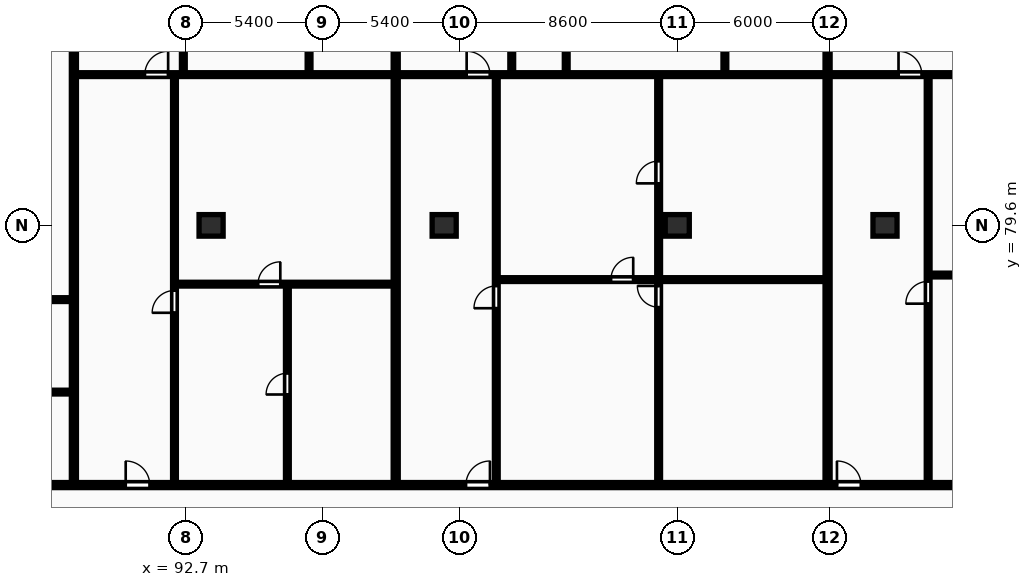
"""IFC4 building model, lengths in metres.
Left out: names, types, materials, properties, quantities, classifications, styles, units other than length and angle.
Written with IfcOpenShell. Run it as: python <this file> out.ifc"""

import sys

from ifc_helpers import new_model, si_unit, direction, frame, frame_2d, origin, origin_2d, place, context, subcontext, project, spatial, rectangle, extrude, element, fill, save


model = new_model("IFC4")
c1 = context("Model", 3, precision=1e-05, world=origin(), true_north=direction((0.0, 1.0)))
c2 = subcontext(c1, "Body", "Model", "MODEL_VIEW")
j1 = project(units=[si_unit("LENGTHUNIT", "METRE"), si_unit("PLANEANGLEUNIT", "RADIAN")], contexts=[c1])
p1 = place(None, origin())
s1 = spatial("IfcSite", under=j1, at=p1, CompositionType="ELEMENT")
p2 = place(p1, origin())
s2 = spatial("IfcBuilding", under=s1, at=p2, CompositionType="ELEMENT")
p3 = place(p2, frame((0.0, 0.0, 80.8)))
s3 = spatial("IfcBuildingStorey", under=s2, at=p3, CompositionType="ELEMENT", Elevation=80.8)
for number, where, z_axis, x_axis in (
    (1, (93.7, 79.6, 0.0), (0.0, 0.0, 1.0), (1.0, 0.0, 0.0)),
    (2, (102.9, 79.6, 0.0), (0.0, 0.0, 1.0), (1.0, 0.0, 0.0)),
    (3, (112.1, 79.6, 0.0), (0.0, 0.0, 1.0), (1.0, 0.0, 0.0)),
    (4, (120.3, 79.6, 0.0), (0.0, 0.0, 1.0), (1.0, 0.0, 0.0)),
):
    element("IfcColumn", number, at=place(p3, frame(where, z_axis=z_axis, x_axis=x_axis)), inside=s3, PredefinedType="COLUMN", context=c2, shape_type="SweptSolid", body=[
        extrude(rectangle(XDim=0.95, YDim=0.85, at=origin_2d()), origin(), (0.0, 0.0, 1.0), 3.25),
    ])
p4 = place(p3, frame((88.285, 69.43, 0.0), z_axis=(0.0, 0.0, 1.0), x_axis=(0.0, 1.0, 0.0)))
e5 = element("IfcWall", 5, at=p4, inside=s3, PredefinedType="PARTITIONING", context=c2, shape_type="SweptSolid", body=[
    extrude(rectangle(XDim=26.47, YDim=0.2, at=frame_2d((13.235, 0.0))), origin(), (0.0, 0.0, 1.0), 2.97),
])
for number, where, z_axis, x_axis in (
    (6, (85.075, 73.02, 0.0), (0.0, 0.0, 1.0), (1.0, 0.0, 0.0)),
    (7, (85.075, 76.67, 0.0), (0.0, 0.0, 1.0), (1.0, 0.0, 0.0)),
):
    element("IfcWall", number, at=place(p3, frame(where, z_axis=z_axis, x_axis=x_axis)), inside=s3, PredefinedType="PARTITIONING", context=c2, shape_type="SweptSolid", body=[
        extrude(rectangle(XDim=3.13, YDim=0.15, at=frame_2d((1.565, 0.0))), origin(), (0.0, 0.0, 1.0), 2.97),
    ])
p5 = place(p3, frame((100.987, 69.43, 0.0), z_axis=(0.0, 0.0, 1.0), x_axis=(0.0, 1.0, 0.0)))
e8 = element("IfcWall", 8, at=p5, inside=s3, PredefinedType="PARTITIONING", context=c2, shape_type="SweptSolid", body=[
    extrude(rectangle(XDim=26.47, YDim=0.2, at=frame_2d((13.235, 0.0))), origin(), (0.0, 0.0, 1.0), 2.97),
])
p6 = place(p3, frame((96.711, 69.41, 0.0), z_axis=(0.0, 0.0, 1.0), x_axis=(0.0, 1.0, 0.0)))
e9 = element("IfcWall", 9, at=p6, inside=s3, PredefinedType="PARTITIONING", context=c2, shape_type="SweptSolid", body=[
    extrude(rectangle(XDim=7.87, YDim=0.15, at=frame_2d((3.935, 0.0))), origin(), (0.0, 0.0, 1.0), 2.97),
])
p7 = place(p6, frame((3.515, 0.0, 0.0)))
e10 = element("IfcOpeningElement", 10, at=p7, cuts=e9, PredefinedType="OPENING", context=c2, shape_type="SweptSolid", body=[
    extrude(rectangle(XDim=0.84, YDim=2.04, at=frame_2d((0.42, 1.02))), frame((0.0, 0.085, 0.0), z_axis=(0.0, -1.0, 0.0), x_axis=(1.0, 0.0, 0.0)), (0.0, 0.0, 1.0), 0.17),
])
p8 = place(p3, frame((92.315, 77.28, 0.0), z_axis=(0.0, 0.0, 1.0), x_axis=(1.0, 0.0, 0.0)))
e11 = element("IfcWall", 11, at=p8, inside=s3, PredefinedType="PARTITIONING", context=c2, shape_type="SweptSolid", body=[
    extrude(rectangle(XDim=8.593, YDim=0.15, at=frame_2d((4.296, 0.0))), origin(), (0.0, 0.0, 1.0), 2.97),
])
p9 = place(p8, frame((3.237, 0.0, 0.0)))
e12 = element("IfcOpeningElement", 12, at=p9, cuts=e11, PredefinedType="OPENING", context=c2, shape_type="SweptSolid", body=[
    extrude(rectangle(XDim=0.88, YDim=2.06, at=frame_2d((0.44, 1.03))), frame((0.0, 0.085, 0.0), z_axis=(0.0, -1.0, 0.0), x_axis=(1.0, 0.0, 0.0)), (0.0, 0.0, 1.0), 0.17),
])
p10 = place(p3, frame((92.255, 69.41, 0.0), z_axis=(0.0, 0.0, 1.0), x_axis=(0.0, 1.0, 0.0)))
e13 = element("IfcWall", 13, at=p10, inside=s3, PredefinedType="PARTITIONING", context=c2, shape_type="SweptSolid", body=[
    extrude(rectangle(XDim=16.1, YDim=0.15, at=frame_2d((8.05, 0.0))), origin(), (0.0, 0.0, 1.0), 2.97),
])
p11 = place(p10, frame((6.74, 0.0, 0.0)))
e14 = element("IfcOpeningElement", 14, at=p11, cuts=e13, PredefinedType="OPENING", context=c2, shape_type="SweptSolid", body=[
    extrude(rectangle(XDim=0.88, YDim=2.06, at=frame_2d((0.44, 1.03))), frame((0.0, 0.085, 0.0), z_axis=(0.0, -1.0, 0.0), x_axis=(1.0, 0.0, 0.0)), (0.0, 0.0, 1.0), 0.17),
])
p12 = place(p3, frame((92.604, 85.59, 0.0), z_axis=(0.0, 0.0, 1.0), x_axis=(0.0, 1.0, 0.0)))
e15 = element("IfcWall", 15, at=p12, inside=s3, PredefinedType="PARTITIONING", context=c2, shape_type="SweptSolid", body=[
    extrude(rectangle(XDim=5.0, YDim=0.15, at=frame_2d((2.5, 0.0))), origin(), (0.0, 0.0, 1.0), 2.97),
])
p13 = place(p12, frame((2.06, 0.0, 0.0)))
e16 = element("IfcOpeningElement", 16, at=p13, cuts=e15, PredefinedType="OPENING", context=c2, shape_type="SweptSolid", body=[
    extrude(rectangle(XDim=0.88, YDim=2.06, at=frame_2d((0.44, 1.03))), frame((0.0, 0.085, 0.0), z_axis=(0.0, -1.0, 0.0), x_axis=(1.0, 0.0, 0.0)), (0.0, 0.0, 1.0), 0.17),
])
p14 = place(p3, frame((97.567, 85.59, 0.0), z_axis=(0.0, 0.0, 1.0), x_axis=(0.0, 1.0, 0.0)))
e17 = element("IfcWall", 17, at=p14, inside=s3, PredefinedType="PARTITIONING", context=c2, shape_type="SweptSolid", body=[
    extrude(rectangle(XDim=10.31, YDim=0.15, at=frame_2d((5.155, 0.0))), origin(), (0.0, 0.0, 1.0), 2.97),
])
p15 = place(p14, frame((1.43, 0.0, 0.0)))
e18 = element("IfcOpeningElement", 18, at=p15, cuts=e17, PredefinedType="OPENING", context=c2, shape_type="SweptSolid", body=[
    extrude(rectangle(XDim=0.84, YDim=2.04, at=frame_2d((0.42, 1.02))), frame((0.0, 0.085, 0.0), z_axis=(0.0, -1.0, 0.0), x_axis=(1.0, 0.0, 0.0)), (0.0, 0.0, 1.0), 0.17),
])
p16 = place(p14, frame((3.92, 0.0, 0.0)))
e19 = element("IfcOpeningElement", 19, at=p16, cuts=e17, PredefinedType="OPENING", context=c2, shape_type="SweptSolid", body=[
    extrude(rectangle(XDim=0.84, YDim=2.04, at=frame_2d((0.42, 1.02))), frame((0.0, 0.085, 0.0), z_axis=(0.0, -1.0, 0.0), x_axis=(1.0, 0.0, 0.0)), (0.0, 0.0, 1.0), 0.17),
])
p17 = place(p14, frame((5.48, 0.0, 0.0)))
e20 = element("IfcOpeningElement", 20, at=p17, cuts=e17, PredefinedType="OPENING", context=c2, shape_type="SweptSolid", body=[
    extrude(rectangle(XDim=0.88, YDim=2.06, at=frame_2d((0.44, 1.03))), frame((0.0, 0.085, 0.0), z_axis=(0.0, -1.0, 0.0), x_axis=(1.0, 0.0, 0.0)), (0.0, 0.0, 1.0), 0.17),
])
p18 = place(p3, frame((88.365, 85.55, 0.0), z_axis=(0.0, 0.0, 1.0), x_axis=(1.0, 0.0, 0.0)))
e21 = element("IfcWall", 21, at=p18, inside=s3, PredefinedType="PARTITIONING", context=c2, shape_type="SweptSolid", body=[
    extrude(rectangle(XDim=12.543, YDim=0.15, at=frame_2d((6.271, 0.0))), origin(), (0.0, 0.0, 1.0), 2.97),
])
p19 = place(p18, frame((2.72, 0.0, 0.0)))
e22 = element("IfcOpeningElement", 22, at=p19, cuts=e21, PredefinedType="OPENING", context=c2, shape_type="SweptSolid", body=[
    extrude(rectangle(XDim=0.92, YDim=2.08, at=frame_2d((0.46, 1.04))), frame((0.0, 0.085, 0.0), z_axis=(0.0, -1.0, 0.0), x_axis=(1.0, 0.0, 0.0)), (0.0, 0.0, 1.0), 0.17),
])
p20 = place(p3, frame((118.033, 69.43, 0.0), z_axis=(0.0, 0.0, 1.0), x_axis=(0.0, 1.0, 0.0)))
e23 = element("IfcWall", 23, at=p20, inside=s3, PredefinedType="PARTITIONING", context=c2, shape_type="SweptSolid", body=[
    extrude(rectangle(XDim=26.47, YDim=0.2, at=frame_2d((13.235, 0.0))), origin(), (0.0, 0.0, 1.0), 2.97),
])
p21 = place(p3, frame((111.365, 69.41, 0.0), z_axis=(0.0, 0.0, 1.0), x_axis=(0.0, 1.0, 0.0)))
e24 = element("IfcWall", 24, at=p21, inside=s3, PredefinedType="PARTITIONING", context=c2, shape_type="SweptSolid", body=[
    extrude(rectangle(XDim=16.1, YDim=0.15, at=frame_2d((8.05, 0.0))), origin(), (0.0, 0.0, 1.0), 2.97),
])
p22 = place(p21, frame((6.96, 0.0, 0.0)))
e25 = element("IfcOpeningElement", 25, at=p22, cuts=e24, PredefinedType="OPENING", context=c2, shape_type="SweptSolid", body=[
    extrude(rectangle(XDim=0.84, YDim=2.04, at=frame_2d((0.42, 1.02))), frame((0.0, 0.085, 0.0), z_axis=(0.0, -1.0, 0.0), x_axis=(1.0, 0.0, 0.0)), (0.0, 0.0, 1.0), 0.17),
])
p23 = place(p21, frame((11.848, 0.0, 0.0)))
e26 = element("IfcOpeningElement", 26, at=p23, cuts=e24, PredefinedType="OPENING", context=c2, shape_type="SweptSolid", body=[
    extrude(rectangle(XDim=0.88, YDim=2.06, at=frame_2d((0.44, 1.03))), frame((0.0, 0.085, 0.0), z_axis=(0.0, -1.0, 0.0), x_axis=(1.0, 0.0, 0.0)), (0.0, 0.0, 1.0), 0.17),
])
p24 = place(p3, frame((105.017, 77.46, 0.0), z_axis=(0.0, 0.0, 1.0), x_axis=(1.0, 0.0, 0.0)))
e27 = element("IfcWall", 27, at=p24, inside=s3, PredefinedType="PARTITIONING", context=c2, shape_type="SweptSolid", body=[
    extrude(rectangle(XDim=12.936, YDim=0.15, at=frame_2d((6.468, 0.0))), origin(), (0.0, 0.0, 1.0), 2.97),
])
p25 = place(p24, frame((4.464, 0.0, 0.0)))
e28 = element("IfcOpeningElement", 28, at=p25, cuts=e27, PredefinedType="OPENING", context=c2, shape_type="SweptSolid", body=[
    extrude(rectangle(XDim=0.88, YDim=2.06, at=frame_2d((0.44, 1.03))), frame((0.0, 0.085, 0.0), z_axis=(0.0, -1.0, 0.0), x_axis=(1.0, 0.0, 0.0)), (0.0, 0.0, 1.0), 0.17),
])
p26 = place(p3, frame((104.957, 69.41, 0.0), z_axis=(0.0, 0.0, 1.0), x_axis=(0.0, 1.0, 0.0)))
e29 = element("IfcWall", 29, at=p26, inside=s3, PredefinedType="PARTITIONING", context=c2, shape_type="SweptSolid", body=[
    extrude(rectangle(XDim=16.1, YDim=0.15, at=frame_2d((8.05, 0.0))), origin(), (0.0, 0.0, 1.0), 2.97),
])
p27 = place(p26, frame((6.92, 0.0, 0.0)))
e30 = element("IfcOpeningElement", 30, at=p27, cuts=e29, PredefinedType="OPENING", context=c2, shape_type="SweptSolid", body=[
    extrude(rectangle(XDim=0.88, YDim=2.06, at=frame_2d((0.44, 1.03))), frame((0.0, 0.085, 0.0), z_axis=(0.0, -1.0, 0.0), x_axis=(1.0, 0.0, 0.0)), (0.0, 0.0, 1.0), 0.17),
])
p28 = place(p3, frame((107.717, 85.59, 0.0), z_axis=(0.0, 0.0, 1.0), x_axis=(0.0, 1.0, 0.0)))
e31 = element("IfcWall", 31, at=p28, inside=s3, PredefinedType="PARTITIONING", context=c2, shape_type="SweptSolid", body=[
    extrude(rectangle(XDim=2.58, YDim=0.15, at=frame_2d((1.29, 0.0))), origin(), (0.0, 0.0, 1.0), 2.97),
])
p29 = place(p3, frame((105.567, 85.59, 0.0), z_axis=(0.0, 0.0, 1.0), x_axis=(0.0, 1.0, 0.0)))
e32 = element("IfcWall", 32, at=p29, inside=s3, PredefinedType="PARTITIONING", context=c2, shape_type="SweptSolid", body=[
    extrude(rectangle(XDim=10.31, YDim=0.15, at=frame_2d((5.155, 0.0))), origin(), (0.0, 0.0, 1.0), 2.97),
])
p30 = place(p29, frame((3.82, 0.0, 0.0)))
e33 = element("IfcOpeningElement", 33, at=p30, cuts=e32, PredefinedType="OPENING", context=c2, shape_type="SweptSolid", body=[
    extrude(rectangle(XDim=0.92, YDim=2.08, at=frame_2d((0.46, 1.04))), frame((0.0, 0.085, 0.0), z_axis=(0.0, -1.0, 0.0), x_axis=(1.0, 0.0, 0.0)), (0.0, 0.0, 1.0), 0.17),
])
p31 = place(p3, frame((113.98, 85.59, 0.0), z_axis=(0.0, 0.0, 1.0), x_axis=(0.0, 1.0, 0.0)))
e34 = element("IfcWall", 34, at=p31, inside=s3, PredefinedType="PARTITIONING", context=c2, shape_type="SweptSolid", body=[
    extrude(rectangle(XDim=2.58, YDim=0.15, at=frame_2d((1.29, 0.0))), origin(), (0.0, 0.0, 1.0), 2.97),
])
p32 = place(p3, frame((101.067, 85.55, 0.0), z_axis=(0.0, 0.0, 1.0), x_axis=(1.0, 0.0, 0.0)))
e35 = element("IfcWall", 35, at=p32, inside=s3, PredefinedType="PARTITIONING", context=c2, shape_type="SweptSolid", body=[
    extrude(rectangle(XDim=16.886, YDim=0.15, at=frame_2d((8.443, 0.0))), origin(), (0.0, 0.0, 1.0), 2.97),
])
p33 = place(p32, frame((2.72, 0.0, 0.0)))
e36 = element("IfcOpeningElement", 36, at=p33, cuts=e35, PredefinedType="OPENING", context=c2, shape_type="SweptSolid", body=[
    extrude(rectangle(XDim=0.92, YDim=2.08, at=frame_2d((0.46, 1.04))), frame((0.0, 0.085, 0.0), z_axis=(0.0, -1.0, 0.0), x_axis=(1.0, 0.0, 0.0)), (0.0, 0.0, 1.0), 0.17),
])
p34 = place(p3, frame((122.063, 77.64, 0.0), z_axis=(0.0, 0.0, 1.0), x_axis=(1.0, 0.0, 0.0)))
e37 = element("IfcWall", 37, at=p34, inside=s3, PredefinedType="PARTITIONING", context=c2, shape_type="SweptSolid", body=[
    extrude(rectangle(XDim=8.457, YDim=0.15, at=frame_2d((4.228, 0.0))), origin(), (0.0, 0.0, 1.0), 2.97),
])
p35 = place(p34, frame((3.171, 0.0, 0.0)))
e38 = element("IfcOpeningElement", 38, at=p35, cuts=e37, PredefinedType="OPENING", context=c2, shape_type="SweptSolid", body=[
    extrude(rectangle(XDim=0.88, YDim=2.06, at=frame_2d((0.44, 1.03))), frame((0.0, 0.085, 0.0), z_axis=(0.0, -1.0, 0.0), x_axis=(1.0, 0.0, 0.0)), (0.0, 0.0, 1.0), 0.17),
])
p36 = place(p3, frame((122.003, 69.41, 0.0), z_axis=(0.0, 0.0, 1.0), x_axis=(0.0, 1.0, 0.0)))
e39 = element("IfcWall", 39, at=p36, inside=s3, PredefinedType="PARTITIONING", context=c2, shape_type="SweptSolid", body=[
    extrude(rectangle(XDim=16.1, YDim=0.15, at=frame_2d((8.05, 0.0))), origin(), (0.0, 0.0, 1.0), 2.97),
])
p37 = place(p36, frame((7.1, 0.0, 0.0)))
e40 = element("IfcOpeningElement", 40, at=p37, cuts=e39, PredefinedType="OPENING", context=c2, shape_type="SweptSolid", body=[
    extrude(rectangle(XDim=0.88, YDim=2.06, at=frame_2d((0.44, 1.03))), frame((0.0, 0.085, 0.0), z_axis=(0.0, -1.0, 0.0), x_axis=(1.0, 0.0, 0.0)), (0.0, 0.0, 1.0), 0.17),
])
p38 = place(p3, frame((118.113, 85.55, 0.0), z_axis=(0.0, 0.0, 1.0), x_axis=(1.0, 0.0, 0.0)))
e41 = element("IfcWall", 41, at=p38, inside=s3, PredefinedType="PARTITIONING", context=c2, shape_type="SweptSolid", body=[
    extrude(rectangle(XDim=12.407, YDim=0.15, at=frame_2d((6.203, 0.0))), origin(), (0.0, 0.0, 1.0), 2.97),
])
p39 = place(p38, frame((2.72, 0.0, 0.0)))
e42 = element("IfcOpeningElement", 42, at=p39, cuts=e41, PredefinedType="OPENING", context=c2, shape_type="SweptSolid", body=[
    extrude(rectangle(XDim=0.92, YDim=2.08, at=frame_2d((0.46, 1.04))), frame((0.0, 0.085, 0.0), z_axis=(0.0, -1.0, 0.0), x_axis=(1.0, 0.0, 0.0)), (0.0, 0.0, 1.0), 0.17),
])
p40 = place(p3, frame((57.6, 69.35, 0.0), z_axis=(0.0, 0.0, 1.0), x_axis=(1.0, 0.0, 0.0)))
e43 = element("IfcWall", 43, at=p40, inside=s3, PredefinedType="PARTITIONING", context=c2, shape_type="SweptSolid", body=[
    extrude(rectangle(XDim=73.0, YDim=0.2, at=frame_2d((36.5, 0.0))), origin(), (0.0, 0.0, 1.0), 2.97),
])
p41 = place(p40, frame((0.37, 0.0, 0.0)))
e44 = element("IfcOpeningElement", 44, at=p41, cuts=e43, PredefinedType="OPENING", context=c2, shape_type="SweptSolid", body=[
    extrude(rectangle(XDim=0.95, YDim=2.15, at=frame_2d((0.475, 1.075))), frame((0.0, 0.11, 0.0), z_axis=(0.0, -1.0, 0.0), x_axis=(1.0, 0.0, 0.0)), (0.0, 0.0, 1.0), 0.22),
])
p42 = place(p40, frame((20.421, 0.0, 0.0)))
e45 = element("IfcOpeningElement", 45, at=p42, cuts=e43, PredefinedType="OPENING", context=c2, shape_type="SweptSolid", body=[
    extrude(rectangle(XDim=1.22, YDim=2.18, at=frame_2d((0.61, 1.09))), frame((0.0, 0.11, 0.0), z_axis=(0.0, -1.0, 0.0), x_axis=(1.0, 0.0, 0.0)), (0.0, 0.0, 1.0), 0.22),
])
p43 = place(p40, frame((32.729, 0.0, 0.0)))
e46 = element("IfcOpeningElement", 46, at=p43, cuts=e43, PredefinedType="OPENING", context=c2, shape_type="SweptSolid", body=[
    extrude(rectangle(XDim=0.95, YDim=2.15, at=frame_2d((0.475, 1.075))), frame((0.0, 0.11, 0.0), z_axis=(0.0, -1.0, 0.0), x_axis=(1.0, 0.0, 0.0)), (0.0, 0.0, 1.0), 0.22),
])
p44 = place(p40, frame((46.157, 0.0, 0.0)))
e47 = element("IfcOpeningElement", 47, at=p44, cuts=e43, PredefinedType="OPENING", context=c2, shape_type="SweptSolid", body=[
    extrude(rectangle(XDim=0.95, YDim=2.15, at=frame_2d((0.475, 1.075))), frame((0.0, 0.11, 0.0), z_axis=(0.0, -1.0, 0.0), x_axis=(1.0, 0.0, 0.0)), (0.0, 0.0, 1.0), 0.22),
])
p45 = place(p40, frame((60.803, 0.0, 0.0)))
e48 = element("IfcOpeningElement", 48, at=p45, cuts=e43, PredefinedType="OPENING", context=c2, shape_type="SweptSolid", body=[
    extrude(rectangle(XDim=0.95, YDim=2.15, at=frame_2d((0.475, 1.075))), frame((0.0, 0.11, 0.0), z_axis=(0.0, -1.0, 0.0), x_axis=(1.0, 0.0, 0.0)), (0.0, 0.0, 1.0), 0.22),
])
p46 = place(p7, origin())
e49 = element("IfcDoor", 49, at=p46, inside=s3, OperationType="SINGLE_SWING_LEFT", PredefinedType="DOOR", context=c2, shape_type="SweptSolid", body=[
    extrude(rectangle(XDim=0.84, YDim=2.04, at=frame_2d((0.42, 1.02))), frame((0.0, 0.025, 0.0), z_axis=(0.0, -1.0, 0.0), x_axis=(1.0, 0.0, 0.0)), (0.0, 0.0, 1.0), 0.05),
])
fill(e10, e49)
p47 = place(p9, origin())
e50 = element("IfcDoor", 50, at=p47, inside=s3, OperationType="SINGLE_SWING_RIGHT", PredefinedType="DOOR", context=c2, shape_type="SweptSolid", body=[
    extrude(rectangle(XDim=0.88, YDim=2.06, at=frame_2d((0.44, 1.03))), frame((0.0, 0.025, 0.0), z_axis=(0.0, -1.0, 0.0), x_axis=(1.0, 0.0, 0.0)), (0.0, 0.0, 1.0), 0.05),
])
fill(e12, e50)
p48 = place(p11, origin())
e51 = element("IfcDoor", 51, at=p48, inside=s3, OperationType="SINGLE_SWING_LEFT", PredefinedType="DOOR", context=c2, shape_type="SweptSolid", body=[
    extrude(rectangle(XDim=0.88, YDim=2.06, at=frame_2d((0.44, 1.03))), frame((0.0, 0.025, 0.0), z_axis=(0.0, -1.0, 0.0), x_axis=(1.0, 0.0, 0.0)), (0.0, 0.0, 1.0), 0.05),
])
fill(e14, e51)
p49 = place(p19, origin())
e52 = element("IfcDoor", 52, at=p49, inside=s3, OperationType="SINGLE_SWING_RIGHT", PredefinedType="DOOR", context=c2, shape_type="SweptSolid", body=[
    extrude(rectangle(XDim=0.92, YDim=2.08, at=frame_2d((0.46, 1.04))), frame((0.0, 0.025, 0.0), z_axis=(0.0, -1.0, 0.0), x_axis=(1.0, 0.0, 0.0)), (0.0, 0.0, 1.0), 0.05),
])
fill(e22, e52)
p50 = place(p22, origin())
e53 = element("IfcDoor", 53, at=p50, inside=s3, OperationType="SINGLE_SWING_RIGHT", PredefinedType="DOOR", context=c2, shape_type="SweptSolid", body=[
    extrude(rectangle(XDim=0.84, YDim=2.04, at=frame_2d((0.42, 1.02))), frame((0.0, 0.025, 0.0), z_axis=(0.0, -1.0, 0.0), x_axis=(1.0, 0.0, 0.0)), (0.0, 0.0, 1.0), 0.05),
])
fill(e25, e53)
p51 = place(p23, origin())
e54 = element("IfcDoor", 54, at=p51, inside=s3, OperationType="SINGLE_SWING_LEFT", PredefinedType="DOOR", context=c2, shape_type="SweptSolid", body=[
    extrude(rectangle(XDim=0.88, YDim=2.06, at=frame_2d((0.44, 1.03))), frame((0.0, 0.025, 0.0), z_axis=(0.0, -1.0, 0.0), x_axis=(1.0, 0.0, 0.0)), (0.0, 0.0, 1.0), 0.05),
])
fill(e26, e54)
p52 = place(p25, origin())
e55 = element("IfcDoor", 55, at=p52, inside=s3, OperationType="SINGLE_SWING_RIGHT", PredefinedType="DOOR", context=c2, shape_type="SweptSolid", body=[
    extrude(rectangle(XDim=0.88, YDim=2.06, at=frame_2d((0.44, 1.03))), frame((0.0, 0.025, 0.0), z_axis=(0.0, -1.0, 0.0), x_axis=(1.0, 0.0, 0.0)), (0.0, 0.0, 1.0), 0.05),
])
fill(e28, e55)
p53 = place(p27, origin())
e56 = element("IfcDoor", 56, at=p53, inside=s3, OperationType="SINGLE_SWING_LEFT", PredefinedType="DOOR", context=c2, shape_type="SweptSolid", body=[
    extrude(rectangle(XDim=0.88, YDim=2.06, at=frame_2d((0.44, 1.03))), frame((0.0, 0.025, 0.0), z_axis=(0.0, -1.0, 0.0), x_axis=(1.0, 0.0, 0.0)), (0.0, 0.0, 1.0), 0.05),
])
fill(e30, e56)
p54 = place(p33, origin())
e57 = element("IfcDoor", 57, at=p54, inside=s3, OperationType="SINGLE_SWING_LEFT", PredefinedType="DOOR", context=c2, shape_type="SweptSolid", body=[
    extrude(rectangle(XDim=0.92, YDim=2.08, at=frame_2d((0.46, 1.04))), frame((0.0, 0.025, 0.0), z_axis=(0.0, -1.0, 0.0), x_axis=(1.0, 0.0, 0.0)), (0.0, 0.0, 1.0), 0.05),
])
fill(e36, e57)
p55 = place(p37, origin())
e58 = element("IfcDoor", 58, at=p55, inside=s3, OperationType="SINGLE_SWING_LEFT", PredefinedType="DOOR", context=c2, shape_type="SweptSolid", body=[
    extrude(rectangle(XDim=0.88, YDim=2.06, at=frame_2d((0.44, 1.03))), frame((0.0, 0.025, 0.0), z_axis=(0.0, -1.0, 0.0), x_axis=(1.0, 0.0, 0.0)), (0.0, 0.0, 1.0), 0.05),
])
fill(e40, e58)
p56 = place(p39, origin())
e59 = element("IfcDoor", 59, at=p56, inside=s3, OperationType="SINGLE_SWING_LEFT", PredefinedType="DOOR", context=c2, shape_type="SweptSolid", body=[
    extrude(rectangle(XDim=0.92, YDim=2.08, at=frame_2d((0.46, 1.04))), frame((0.0, 0.025, 0.0), z_axis=(0.0, -1.0, 0.0), x_axis=(1.0, 0.0, 0.0)), (0.0, 0.0, 1.0), 0.05),
])
fill(e42, e59)
p57 = place(p43, origin())
e60 = element("IfcDoor", 60, at=p57, inside=s3, OperationType="SINGLE_SWING_LEFT", PredefinedType="DOOR", context=c2, shape_type="SweptSolid", body=[
    extrude(rectangle(XDim=0.95, YDim=2.15, at=frame_2d((0.475, 1.075))), frame((0.0, 0.025, 0.0), z_axis=(0.0, -1.0, 0.0), x_axis=(1.0, 0.0, 0.0)), (0.0, 0.0, 1.0), 0.05),
])
fill(e46, e60)
p58 = place(p44, origin())
e61 = element("IfcDoor", 61, at=p58, inside=s3, OperationType="SINGLE_SWING_RIGHT", PredefinedType="DOOR", context=c2, shape_type="SweptSolid", body=[
    extrude(rectangle(XDim=0.95, YDim=2.15, at=frame_2d((0.475, 1.075))), frame((0.0, 0.025, 0.0), z_axis=(0.0, -1.0, 0.0), x_axis=(1.0, 0.0, 0.0)), (0.0, 0.0, 1.0), 0.05),
])
fill(e47, e61)
p59 = place(p45, origin())
e62 = element("IfcDoor", 62, at=p59, inside=s3, OperationType="SINGLE_SWING_LEFT", PredefinedType="DOOR", context=c2, shape_type="SweptSolid", body=[
    extrude(rectangle(XDim=0.95, YDim=2.15, at=frame_2d((0.475, 1.075))), frame((0.0, 0.025, 0.0), z_axis=(0.0, -1.0, 0.0), x_axis=(1.0, 0.0, 0.0)), (0.0, 0.0, 1.0), 0.05),
])
fill(e48, e62)
save(model, sys.argv[1])
